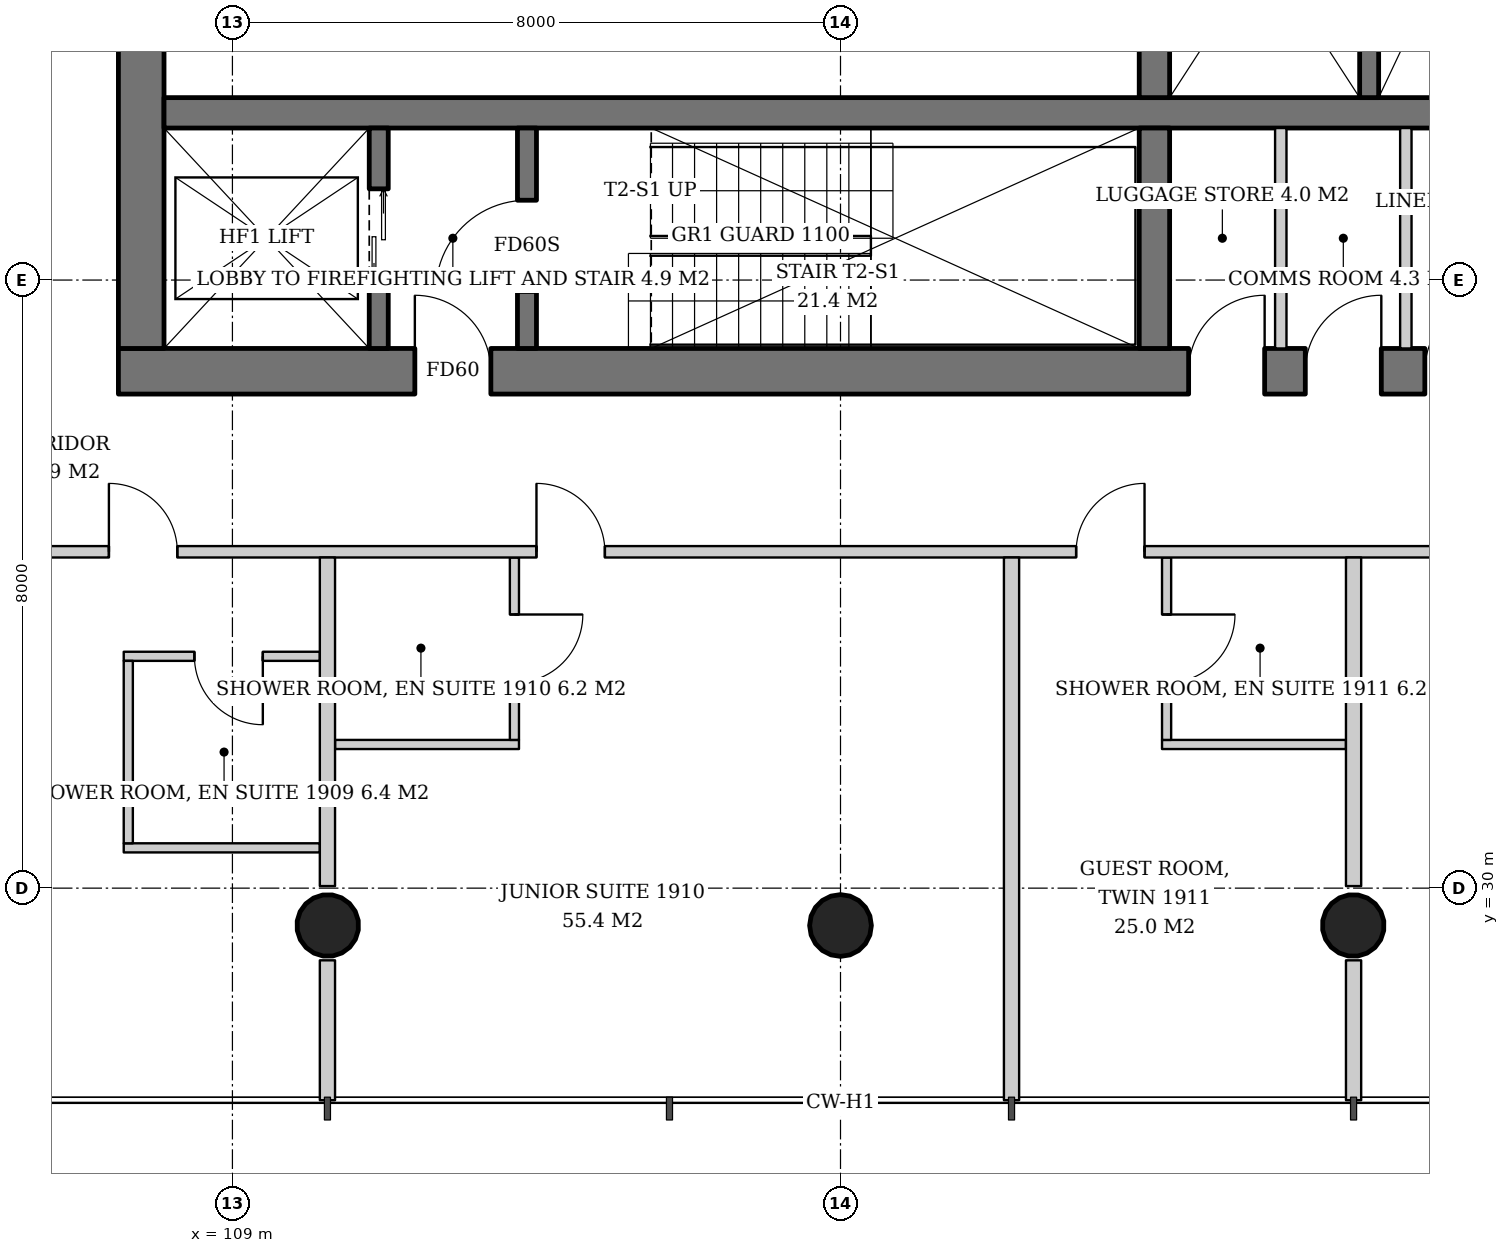
"""IFC4 building model, lengths in metres.
Left out: names, types, materials, properties, quantities, classifications, styles, units other than length and angle.
Written with IfcOpenShell. Run it as: python <this file> out.ifc"""

import sys

from ifc_helpers import new_model, si_unit, direction, frame, frame_2d, origin, origin_2d, place, context, subcontext, project, spatial, rectangle, hollow_circle, extrude, element, fill, save


model = new_model("IFC4")
c1 = context("Model", 3, precision=1e-05, world=origin(), true_north=direction((0.0, 1.0)))
c2 = subcontext(c1, "Body", "Model", "MODEL_VIEW")
j1 = project(units=[si_unit("LENGTHUNIT", "METRE"), si_unit("PLANEANGLEUNIT", "RADIAN")], contexts=[c1])
p1 = place(None, origin())
s1 = spatial("IfcSite", under=j1, at=p1, CompositionType="ELEMENT")
p2 = place(p1, origin())
s2 = spatial("IfcBuilding", under=s1, at=p2, CompositionType="ELEMENT")
p3 = place(p2, frame((0.0, 0.0, 78.0)))
s3 = spatial("IfcBuildingStorey", under=s2, at=p3, CompositionType="ELEMENT", Elevation=78.0)
p4 = place(p3, frame((110.229, 29.457, 0.0), z_axis=(0.021497706284, 0.043059584825, 0.998841188968), x_axis=(-0.894693706707, 0.446680166538, 0.0)))
e1 = element("IfcColumn", 1, at=p4, inside=s3, PredefinedType="COLUMN", context=c2, shape_type="SweptSolid", body=[
    extrude(hollow_circle(Radius=0.406, WallThickness=0.03, at=origin_2d()), origin(), (0.0, 0.0, 1.0), 3.804),
])
p5 = place(p3, frame((117.0, 29.457, 0.0), z_axis=(0.0, 0.043069538298, 0.999072076915), x_axis=(-1.0, 0.0, 0.0)))
e2 = element("IfcColumn", 2, at=p5, inside=s3, PredefinedType="COLUMN", context=c2, shape_type="SweptSolid", body=[
    extrude(hollow_circle(Radius=0.406, WallThickness=0.03, at=origin_2d()), origin(), (0.0, 0.0, 1.0), 3.803),
])
p6 = place(p3, frame((123.771, 29.457, 0.0), z_axis=(-0.021497706284, 0.043059584825, 0.998841188968), x_axis=(-0.894693706707, -0.446680166538, 0.0)))
e3 = element("IfcColumn", 3, at=p6, inside=s3, PredefinedType="COLUMN", context=c2, shape_type="SweptSolid", body=[
    extrude(hollow_circle(Radius=0.406, WallThickness=0.03, at=origin_2d()), origin(), (0.0, 0.0, 1.0), 3.804),
])
p7 = place(p3, frame((107.5, 36.8, 0.0), z_axis=(0.0, 0.0, 1.0), x_axis=(1.0, 0.0, 0.0)))
e4 = element("IfcWall", 4, at=p7, inside=s3, PredefinedType="SHEAR", context=c2, shape_type="SweptSolid", body=[
    extrude(rectangle(XDim=19.0, YDim=0.6, at=frame_2d((9.5, 0.0))), origin(), (0.0, 0.0, 1.0), 3.8),
])
p8 = place(p7, frame((3.9, 0.0, 0.0)))
e5 = element("IfcOpeningElement", 5, at=p8, cuts=e4, PredefinedType="OPENING", context=c2, shape_type="SweptSolid", body=[
    extrude(rectangle(XDim=1.0, YDim=2.1, at=frame_2d((0.5, 1.05))), frame((0.0, 0.31, 0.0), z_axis=(0.0, -1.0, 0.0), x_axis=(1.0, 0.0, 0.0)), (0.0, 0.0, 1.0), 0.62),
])
p9 = place(p7, frame((14.08, 0.0, 0.0)))
e6 = element("IfcOpeningElement", 6, at=p9, cuts=e4, PredefinedType="OPENING", context=c2, shape_type="SweptSolid", body=[
    extrude(rectangle(XDim=1.0, YDim=2.1, at=frame_2d((0.5, 1.05))), frame((0.0, 0.31, 0.0), z_axis=(0.0, -1.0, 0.0), x_axis=(1.0, 0.0, 0.0)), (0.0, 0.0, 1.0), 0.62),
])
p10 = place(p7, frame((15.615, 0.0, 0.0)))
e7 = element("IfcOpeningElement", 7, at=p10, cuts=e4, PredefinedType="OPENING", context=c2, shape_type="SweptSolid", body=[
    extrude(rectangle(XDim=1.0, YDim=2.1, at=frame_2d((0.5, 1.05))), frame((0.0, 0.31, 0.0), z_axis=(0.0, -1.0, 0.0), x_axis=(1.0, 0.0, 0.0)), (0.0, 0.0, 1.0), 0.62),
])
p11 = place(p7, frame((17.188, 0.0, 0.0)))
e8 = element("IfcOpeningElement", 8, at=p11, cuts=e4, PredefinedType="OPENING", context=c2, shape_type="SweptSolid", body=[
    extrude(rectangle(XDim=1.0, YDim=2.1, at=frame_2d((0.5, 1.05))), frame((0.0, 0.31, 0.0), z_axis=(0.0, -1.0, 0.0), x_axis=(1.0, 0.0, 0.0)), (0.0, 0.0, 1.0), 0.62),
])
p12 = place(p3, frame((107.8, 37.1, 0.0), z_axis=(0.0, 0.0, 1.0), x_axis=(0.0, 1.0, 0.0)))
e9 = element("IfcWall", 9, at=p12, inside=s3, PredefinedType="SHEAR", context=c2, shape_type="SweptSolid", body=[
    extrude(rectangle(XDim=17.8, YDim=0.6, at=frame_2d((8.9, 0.0))), origin(), (0.0, 0.0, 1.0), 3.8),
])
p13 = place(p12, frame((8.0, 0.0, 0.0)))
e10 = element("IfcOpeningElement", 10, at=p13, cuts=e9, PredefinedType="OPENING", context=c2, shape_type="SweptSolid", body=[
    extrude(rectangle(XDim=1.8, YDim=2.4, at=frame_2d((0.9, 1.2))), frame((0.0, 0.31, 0.0), z_axis=(0.0, -1.0, 0.0), x_axis=(1.0, 0.0, 0.0)), (0.0, 0.0, 1.0), 0.62),
])
p14 = place(p3, frame((108.1, 40.2, 0.0), z_axis=(0.0, 0.0, 1.0), x_axis=(1.0, 0.0, 0.0)))
e11 = element("IfcWall", 11, at=p14, inside=s3, PredefinedType="SHEAR", context=c2, shape_type="SweptSolid", body=[
    extrude(rectangle(XDim=17.8, YDim=0.4, at=frame_2d((8.9, 0.0))), origin(), (0.0, 0.0, 1.0), 3.8),
])
p15 = place(p3, frame((121.13, 37.1, 0.0), z_axis=(0.0, 0.0, 1.0), x_axis=(0.0, 1.0, 0.0)))
e12 = element("IfcWall", 12, at=p15, inside=s3, PredefinedType="SHEAR", context=c2, shape_type="SweptSolid", body=[
    extrude(rectangle(XDim=2.9, YDim=0.4, at=frame_2d((1.45, 0.0))), origin(), (0.0, 0.0, 1.0), 3.8),
])
p16 = place(p3, frame((121.13, 40.4, 0.0), z_axis=(0.0, 0.0, 1.0), x_axis=(0.0, 1.0, 0.0)))
e13 = element("IfcWall", 13, at=p16, inside=s3, PredefinedType="SHEAR", context=c2, shape_type="SweptSolid", body=[
    extrude(rectangle(XDim=11.2, YDim=0.4, at=frame_2d((5.6, 0.0))), origin(), (0.0, 0.0, 1.0), 3.8),
])
p17 = place(p3, frame((110.925, 37.1, 0.0), z_axis=(0.0, 0.0, 1.0), x_axis=(0.0, 1.0, 0.0)))
e14 = element("IfcWall", 14, at=p17, inside=s3, PredefinedType="SHEAR", context=c2, shape_type="SweptSolid", body=[
    extrude(rectangle(XDim=2.9, YDim=0.25, at=frame_2d((1.45, 0.0))), origin(), (0.0, 0.0, 1.0), 3.8),
])
p18 = place(p17, frame((0.8, 0.0, 0.0)))
e15 = element("IfcOpeningElement", 15, at=p18, cuts=e14, PredefinedType="OPENING", context=c2, shape_type="SweptSolid", body=[
    extrude(rectangle(XDim=1.3, YDim=2.2, at=frame_2d((0.65, 1.1))), frame((0.0, 0.135, 0.0), z_axis=(0.0, -1.0, 0.0), x_axis=(1.0, 0.0, 0.0)), (0.0, 0.0, 1.0), 0.27),
])
p19 = place(p3, frame((112.875, 37.1, 0.0), z_axis=(0.0, 0.0, 1.0), x_axis=(0.0, 1.0, 0.0)))
e16 = element("IfcWall", 16, at=p19, inside=s3, PredefinedType="SHEAR", context=c2, shape_type="SweptSolid", body=[
    extrude(rectangle(XDim=2.9, YDim=0.25, at=frame_2d((1.45, 0.0))), origin(), (0.0, 0.0, 1.0), 3.8),
])
p20 = place(p19, frame((0.75, 0.0, 0.0)))
e17 = element("IfcOpeningElement", 17, at=p20, cuts=e16, PredefinedType="OPENING", context=c2, shape_type="SweptSolid", body=[
    extrude(rectangle(XDim=1.2, YDim=2.1, at=frame_2d((0.6, 1.05))), frame((0.0, 0.135, 0.0), z_axis=(0.0, -1.0, 0.0), x_axis=(1.0, 0.0, 0.0)), (0.0, 0.0, 1.0), 0.27),
])
p21 = place(p3, frame((123.955, 44.25, 0.0), z_axis=(0.0, 0.0, 1.0), x_axis=(0.0, -1.0, 0.0)))
e18 = element("IfcWall", 18, at=p21, inside=s3, PredefinedType="SHEAR", context=c2, shape_type="SweptSolid", body=[
    extrude(rectangle(XDim=3.85, YDim=0.25, at=frame_2d((1.925, 0.0))), origin(), (0.0, 0.0, 1.0), 3.8),
])
for number, where, z_axis, x_axis in (
    (19, (122.792, 37.1, 0.0), (0.0, 0.0, 1.0), (0.0, 1.0, 0.0)),
    (20, (124.438, 37.1, 0.0), (0.0, 0.0, 1.0), (0.0, 1.0, 0.0)),
):
    element("IfcWall", number, at=place(p3, frame(where, z_axis=z_axis, x_axis=x_axis)), inside=s3, PredefinedType="SOLIDWALL", context=c2, shape_type="SweptSolid", body=[
        extrude(rectangle(XDim=2.9, YDim=0.15, at=frame_2d((1.45, 0.0))), origin(), (0.0, 0.0, 1.0), 3.52),
    ])
p22 = place(p3, frame((110.15, 33.05, 0.0), z_axis=(0.0, 0.0, 1.0), x_axis=(-1.0, 0.0, 0.0)))
e21 = element("IfcWall", 21, at=p22, inside=s3, PredefinedType="PARTITIONING", context=c2, shape_type="SweptSolid", body=[
    extrude(rectangle(XDim=2.58, YDim=0.12, at=frame_2d((1.29, 0.0))), origin(), (0.0, 0.0, 1.0), 2.82),
])
p23 = place(p22, frame((0.75, 0.0, 0.0)))
e22 = element("IfcOpeningElement", 22, at=p23, cuts=e21, PredefinedType="OPENING", context=c2, shape_type="SweptSolid", body=[
    extrude(rectangle(XDim=0.9, YDim=2.1, at=frame_2d((0.45, 1.05))), frame((0.0, 0.07, 0.0), z_axis=(0.0, -1.0, 0.0), x_axis=(1.0, 0.0, 0.0)), (0.0, 0.0, 1.0), 0.14),
])
p24 = place(p3, frame((110.15, 30.53, 0.0), z_axis=(0.0, 0.0, 1.0), x_axis=(-1.0, 0.0, 0.0)))
e23 = element("IfcWall", 23, at=p24, inside=s3, PredefinedType="PARTITIONING", context=c2, shape_type="SweptSolid", body=[
    extrude(rectangle(XDim=2.58, YDim=0.12, at=frame_2d((1.29, 0.0))), origin(), (0.0, 0.0, 1.0), 2.82),
])
p25 = place(p3, frame((107.63, 32.99, 0.0), z_axis=(0.0, 0.0, 1.0), x_axis=(0.0, -1.0, 0.0)))
e24 = element("IfcWall", 24, at=p25, inside=s3, PredefinedType="PARTITIONING", context=c2, shape_type="SweptSolid", body=[
    extrude(rectangle(XDim=2.4, YDim=0.12, at=frame_2d((1.2, 0.0))), origin(), (0.0, 0.0, 1.0), 2.82),
])
p26 = place(p3, frame((110.35, 31.89, 0.0), z_axis=(0.0, 0.0, 1.0), x_axis=(1.0, 0.0, 0.0)))
e25 = element("IfcWall", 25, at=p26, inside=s3, PredefinedType="PARTITIONING", context=c2, shape_type="SweptSolid", body=[
    extrude(rectangle(XDim=2.42, YDim=0.12, at=frame_2d((1.21, 0.0))), origin(), (0.0, 0.0, 1.0), 2.72),
])
p27 = place(p3, frame((112.71, 34.35, 0.0), z_axis=(0.0, 0.0, 1.0), x_axis=(0.0, -1.0, 0.0)))
e26 = element("IfcWall", 26, at=p27, inside=s3, PredefinedType="PARTITIONING", context=c2, shape_type="SweptSolid", body=[
    extrude(rectangle(XDim=2.4, YDim=0.12, at=frame_2d((1.2, 0.0))), origin(), (0.0, 0.0, 1.0), 3.52),
])
p28 = place(p27, frame((0.75, 0.0, 0.0)))
e27 = element("IfcOpeningElement", 27, at=p28, cuts=e26, PredefinedType="OPENING", context=c2, shape_type="SweptSolid", body=[
    extrude(rectangle(XDim=0.9, YDim=2.1, at=frame_2d((0.45, 1.05))), frame((0.0, 0.07, 0.0), z_axis=(0.0, -1.0, 0.0), x_axis=(1.0, 0.0, 0.0)), (0.0, 0.0, 1.0), 0.14),
])
p29 = place(p3, frame((121.23, 31.89, 0.0), z_axis=(0.0, 0.0, 1.0), x_axis=(1.0, 0.0, 0.0)))
e28 = element("IfcWall", 28, at=p29, inside=s3, PredefinedType="PARTITIONING", context=c2, shape_type="SweptSolid", body=[
    extrude(rectangle(XDim=2.42, YDim=0.12, at=frame_2d((1.21, 0.0))), origin(), (0.0, 0.0, 1.0), 3.52),
])
p30 = place(p3, frame((121.29, 34.35, 0.0), z_axis=(0.0, 0.0, 1.0), x_axis=(0.0, -1.0, 0.0)))
e29 = element("IfcWall", 29, at=p30, inside=s3, PredefinedType="PARTITIONING", context=c2, shape_type="SweptSolid", body=[
    extrude(rectangle(XDim=2.4, YDim=0.12, at=frame_2d((1.2, 0.0))), origin(), (0.0, 0.0, 1.0), 3.52),
])
p31 = place(p30, frame((0.75, 0.0, 0.0)))
e30 = element("IfcOpeningElement", 30, at=p31, cuts=e29, PredefinedType="OPENING", context=c2, shape_type="SweptSolid", body=[
    extrude(rectangle(XDim=0.9, YDim=2.1, at=frame_2d((0.45, 1.05))), frame((0.0, 0.07, 0.0), z_axis=(0.0, -1.0, 0.0), x_axis=(1.0, 0.0, 0.0)), (0.0, 0.0, 1.0), 0.14),
])
p32 = place(p3, frame((105.35, 34.425, 0.0), z_axis=(0.0, 0.0, 1.0), x_axis=(1.0, 0.0, 0.0)))
e31 = element("IfcWall", 31, at=p32, inside=s3, PredefinedType="PARTITIONING", context=c2, shape_type="SweptSolid", body=[
    extrude(rectangle(XDim=23.15, YDim=0.15, at=frame_2d((11.575, 0.0))), origin(), (0.0, 0.0, 1.0), 2.72),
])
p33 = place(p32, frame((2.025, 0.0, 0.0)))
e32 = element("IfcOpeningElement", 32, at=p33, cuts=e31, PredefinedType="OPENING", context=c2, shape_type="SweptSolid", body=[
    extrude(rectangle(XDim=0.9, YDim=2.1, at=frame_2d((0.45, 1.05))), frame((0.0, 0.085, 0.0), z_axis=(0.0, -1.0, 0.0), x_axis=(1.0, 0.0, 0.0)), (0.0, 0.0, 1.0), 0.17),
])
p34 = place(p32, frame((7.65, 0.0, 0.0)))
e33 = element("IfcOpeningElement", 33, at=p34, cuts=e31, PredefinedType="OPENING", context=c2, shape_type="SweptSolid", body=[
    extrude(rectangle(XDim=0.9, YDim=2.1, at=frame_2d((0.45, 1.05))), frame((0.0, 0.085, 0.0), z_axis=(0.0, -1.0, 0.0), x_axis=(1.0, 0.0, 0.0)), (0.0, 0.0, 1.0), 0.17),
])
p35 = place(p32, frame((14.75, 0.0, 0.0)))
e34 = element("IfcOpeningElement", 34, at=p35, cuts=e31, PredefinedType="OPENING", context=c2, shape_type="SweptSolid", body=[
    extrude(rectangle(XDim=0.9, YDim=2.1, at=frame_2d((0.45, 1.05))), frame((0.0, 0.085, 0.0), z_axis=(0.0, -1.0, 0.0), x_axis=(1.0, 0.0, 0.0)), (0.0, 0.0, 1.0), 0.17),
])
p36 = place(p3, frame((110.25, 34.35, 0.0), z_axis=(0.0, 0.0, 1.0), x_axis=(0.0, -1.0, 0.0)))
e35 = element("IfcWall", 35, at=p36, inside=s3, PredefinedType="PARTITIONING", context=c2, shape_type="SweptSolid", body=[
    extrude(rectangle(XDim=4.323, YDim=0.2, at=frame_2d((2.162, 0.0))), origin(), (0.0, 0.0, 1.0), 3.52),
])
p37 = place(p3, frame((110.25, 29.05, 0.0), z_axis=(0.0, 0.0, 1.0), x_axis=(0.0, -1.0, 0.0)))
e36 = element("IfcWall", 36, at=p37, inside=s3, PredefinedType="PARTITIONING", context=c2, shape_type="SweptSolid", body=[
    extrude(rectangle(XDim=1.84, YDim=0.2, at=frame_2d((0.92, 0.0))), origin(), (0.0, 0.0, 1.0), 3.52),
])
p38 = place(p3, frame((119.25, 34.35, 0.0), z_axis=(0.0, 0.0, 1.0), x_axis=(0.0, -1.0, 0.0)))
e37 = element("IfcWall", 37, at=p38, inside=s3, PredefinedType="PARTITIONING", context=c2, shape_type="SweptSolid", body=[
    extrude(rectangle(XDim=7.14, YDim=0.2, at=frame_2d((3.57, 0.0))), origin(), (0.0, 0.0, 1.0), 3.12),
])
p39 = place(p3, frame((123.75, 34.35, 0.0), z_axis=(0.0, 0.0, 1.0), x_axis=(0.0, -1.0, 0.0)))
e38 = element("IfcWall", 38, at=p39, inside=s3, PredefinedType="PARTITIONING", context=c2, shape_type="SweptSolid", body=[
    extrude(rectangle(XDim=4.323, YDim=0.2, at=frame_2d((2.162, 0.0))), origin(), (0.0, 0.0, 1.0), 3.52),
])
p40 = place(p3, frame((123.75, 29.05, 0.0), z_axis=(0.0, 0.0, 1.0), x_axis=(0.0, -1.0, 0.0)))
e39 = element("IfcWall", 39, at=p40, inside=s3, PredefinedType="PARTITIONING", context=c2, shape_type="SweptSolid", body=[
    extrude(rectangle(XDim=1.84, YDim=0.2, at=frame_2d((0.92, 0.0))), origin(), (0.0, 0.0, 1.0), 3.52),
])
p41 = place(p18, origin())
e40 = element("IfcDoor", 40, at=p41, inside=s3, OperationType="DOUBLE_DOOR_SLIDING", PredefinedType="DOOR", context=c2, shape_type="SweptSolid", body=[
    extrude(rectangle(XDim=1.3, YDim=2.2, at=frame_2d((0.65, 1.1))), frame((0.0, 0.025, 0.0), z_axis=(0.0, -1.0, 0.0), x_axis=(1.0, 0.0, 0.0)), (0.0, 0.0, 1.0), 0.05),
])
fill(e15, e40)
p42 = place(p20, origin())
e41 = element("IfcDoor", 41, at=p42, inside=s3, OperationType="SINGLE_SWING_LEFT", PredefinedType="DOOR", context=c2, shape_type="SweptSolid", body=[
    extrude(rectangle(XDim=1.2, YDim=2.1, at=frame_2d((0.6, 1.05))), frame((0.0, 0.025, 0.0), z_axis=(0.0, -1.0, 0.0), x_axis=(1.0, 0.0, 0.0)), (0.0, 0.0, 1.0), 0.05),
])
fill(e17, e41)
p43 = place(p8, origin())
e42 = element("IfcDoor", 42, at=p43, inside=s3, OperationType="SINGLE_SWING_LEFT", PredefinedType="DOOR", context=c2, shape_type="SweptSolid", body=[
    extrude(rectangle(XDim=1.0, YDim=2.1, at=frame_2d((0.5, 1.05))), frame((0.0, 0.025, 0.0), z_axis=(0.0, -1.0, 0.0), x_axis=(1.0, 0.0, 0.0)), (0.0, 0.0, 1.0), 0.05),
])
fill(e5, e42)
p44 = place(p9, origin())
e43 = element("IfcDoor", 43, at=p44, inside=s3, OperationType="SINGLE_SWING_RIGHT", PredefinedType="DOOR", context=c2, shape_type="SweptSolid", body=[
    extrude(rectangle(XDim=1.0, YDim=2.1, at=frame_2d((0.5, 1.05))), frame((0.0, 0.29, 0.0), z_axis=(0.0, -1.0, 0.0), x_axis=(1.0, 0.0, 0.0)), (0.0, 0.0, 1.0), 0.05),
])
fill(e6, e43)
p45 = place(p10, origin())
e44 = element("IfcDoor", 44, at=p45, inside=s3, OperationType="SINGLE_SWING_RIGHT", PredefinedType="DOOR", context=c2, shape_type="SweptSolid", body=[
    extrude(rectangle(XDim=1.0, YDim=2.1, at=frame_2d((0.5, 1.05))), frame((0.0, 0.29, 0.0), z_axis=(0.0, -1.0, 0.0), x_axis=(1.0, 0.0, 0.0)), (0.0, 0.0, 1.0), 0.05),
])
fill(e7, e44)
p46 = place(p11, origin())
e45 = element("IfcDoor", 45, at=p46, inside=s3, OperationType="SINGLE_SWING_RIGHT", PredefinedType="DOOR", context=c2, shape_type="SweptSolid", body=[
    extrude(rectangle(XDim=1.0, YDim=2.1, at=frame_2d((0.5, 1.05))), frame((0.0, 0.29, 0.0), z_axis=(0.0, -1.0, 0.0), x_axis=(1.0, 0.0, 0.0)), (0.0, 0.0, 1.0), 0.05),
])
fill(e8, e45)
p47 = place(p23, origin())
e46 = element("IfcDoor", 46, at=p47, inside=s3, OperationType="SINGLE_SWING_LEFT", PredefinedType="DOOR", context=c2, shape_type="SweptSolid", body=[
    extrude(rectangle(XDim=0.9, YDim=2.1, at=frame_2d((0.45, 1.05))), frame((0.0, 0.025, 0.0), z_axis=(0.0, -1.0, 0.0), x_axis=(1.0, 0.0, 0.0)), (0.0, 0.0, 1.0), 0.05),
])
fill(e22, e46)
p48 = place(p28, origin())
e47 = element("IfcDoor", 47, at=p48, inside=s3, OperationType="SINGLE_SWING_LEFT", PredefinedType="DOOR", context=c2, shape_type="SweptSolid", body=[
    extrude(rectangle(XDim=0.9, YDim=2.1, at=frame_2d((0.45, 1.05))), frame((0.0, 0.025, 0.0), z_axis=(0.0, -1.0, 0.0), x_axis=(1.0, 0.0, 0.0)), (0.0, 0.0, 1.0), 0.05),
])
fill(e27, e47)
p49 = place(p31, origin())
e48 = element("IfcDoor", 48, at=p49, inside=s3, OperationType="SINGLE_SWING_LEFT", PredefinedType="DOOR", context=c2, shape_type="SweptSolid", body=[
    extrude(rectangle(XDim=0.9, YDim=2.1, at=frame_2d((0.45, 1.05))), frame((0.0, 0.025, 0.0), z_axis=(0.0, -1.0, 0.0), x_axis=(1.0, 0.0, 0.0)), (0.0, 0.0, 1.0), 0.05),
])
fill(e30, e48)
p50 = place(p33, origin())
e49 = element("IfcDoor", 49, at=p50, inside=s3, OperationType="SINGLE_SWING_LEFT", PredefinedType="DOOR", context=c2, shape_type="SweptSolid", body=[
    extrude(rectangle(XDim=0.9, YDim=2.1, at=frame_2d((0.45, 1.05))), frame((0.0, 0.025, 0.0), z_axis=(0.0, -1.0, 0.0), x_axis=(1.0, 0.0, 0.0)), (0.0, 0.0, 1.0), 0.05),
])
fill(e32, e49)
p51 = place(p34, origin())
e50 = element("IfcDoor", 50, at=p51, inside=s3, OperationType="SINGLE_SWING_LEFT", PredefinedType="DOOR", context=c2, shape_type="SweptSolid", body=[
    extrude(rectangle(XDim=0.9, YDim=2.1, at=frame_2d((0.45, 1.05))), frame((0.0, 0.025, 0.0), z_axis=(0.0, -1.0, 0.0), x_axis=(1.0, 0.0, 0.0)), (0.0, 0.0, 1.0), 0.05),
])
fill(e33, e50)
p52 = place(p35, origin())
e51 = element("IfcDoor", 51, at=p52, inside=s3, OperationType="SINGLE_SWING_RIGHT", PredefinedType="DOOR", context=c2, shape_type="SweptSolid", body=[
    extrude(rectangle(XDim=0.9, YDim=2.1, at=frame_2d((0.45, 1.05))), frame((0.0, 0.025, 0.0), z_axis=(0.0, -1.0, 0.0), x_axis=(1.0, 0.0, 0.0)), (0.0, 0.0, 1.0), 0.05),
])
fill(e34, e51)
save(model, sys.argv[1])
